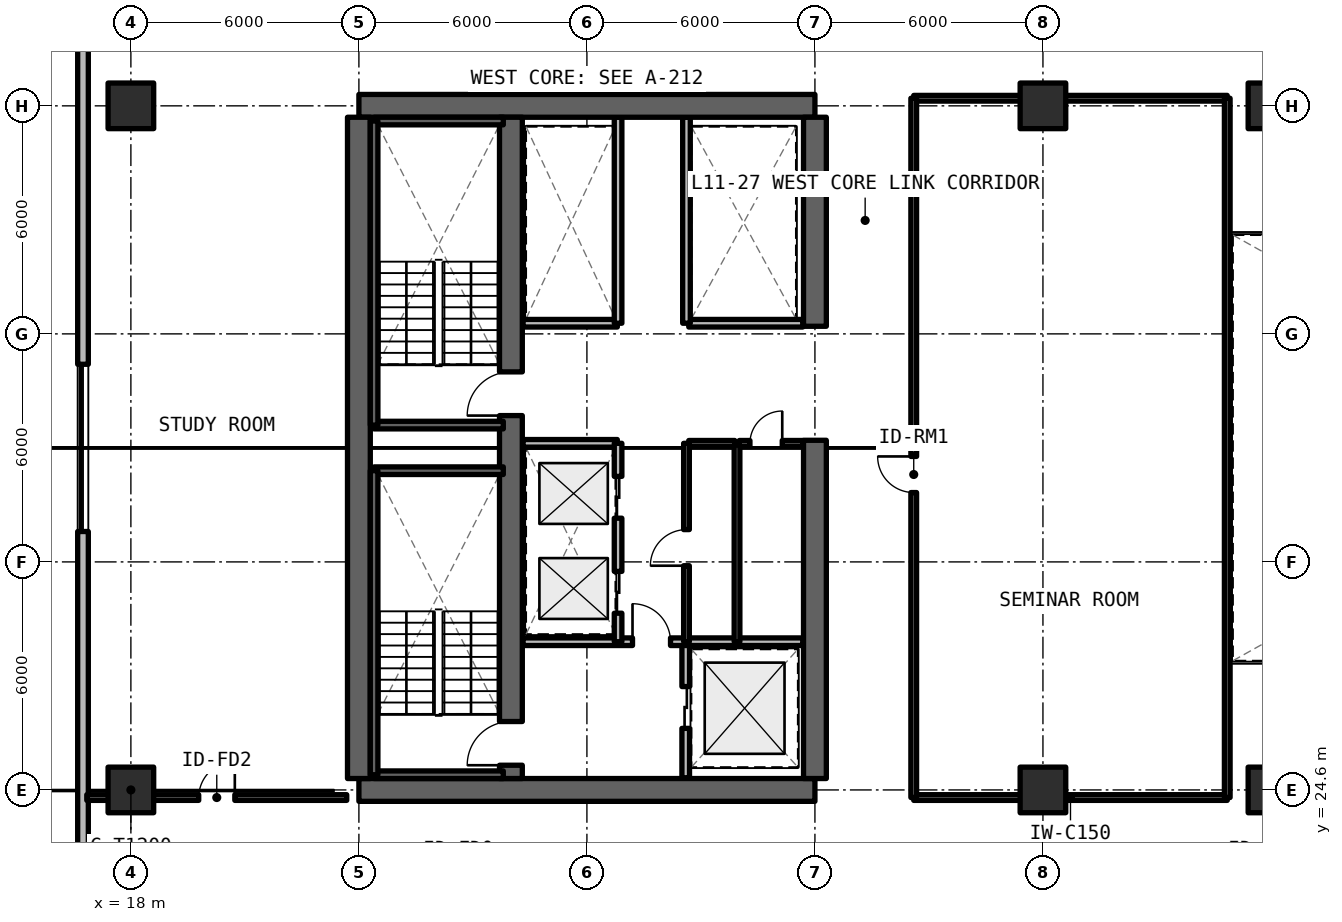
"""IFC4 building model, lengths in metres.
Left out: names, types, materials, properties, quantities, classifications, styles, units other than length and angle.
Written with IfcOpenShell. Run it as: python <this file> out.ifc"""

import sys

from ifc_helpers import new_model, si_unit, direction, frame, frame_2d, origin, origin_2d, place, context, subcontext, project, spatial, rectangle, extrude, element, fill, save


model = new_model("IFC4")
c1 = context("Model", 3, precision=1e-05, world=origin(), true_north=direction((0.0, 1.0)))
c2 = subcontext(c1, "Body", "Model", "MODEL_VIEW")
j1 = project(units=[si_unit("LENGTHUNIT", "METRE"), si_unit("PLANEANGLEUNIT", "RADIAN")], contexts=[c1])
p1 = place(None, origin())
s1 = spatial("IfcSite", under=j1, at=p1, CompositionType="ELEMENT")
p2 = place(p1, origin())
s2 = spatial("IfcBuilding", under=s1, at=p2, CompositionType="ELEMENT")
p3 = place(p2, frame((0.0, 0.0, 42.24)))
s3 = spatial("IfcBuildingStorey", under=s2, at=p3, CompositionType="ELEMENT", Elevation=42.24)
for number, where, z_axis, x_axis in (
    (1, (24.0, 24.6, 0.0), (0.0, 0.0, 1.0), (1.0, 0.0, 0.0)),
    (2, (36.0, 42.6, 0.0), (0.0, 0.0, 1.0), (-1.0, 0.0, 0.0)),
):
    element("IfcWall", number, at=place(p3, frame(where, z_axis=z_axis, x_axis=x_axis)), inside=s3, PredefinedType="SHEAR", context=c2, shape_type="SweptSolid", body=[
        extrude(rectangle(XDim=12.0, YDim=0.6, at=frame_2d((6.0, 0.0))), origin(), (0.0, 0.0, 1.0), 3.3),
    ])
p4 = place(p3, frame((24.0, 24.9, 0.0), z_axis=(0.0, 0.0, 1.0), x_axis=(0.0, 1.0, 0.0)))
e3 = element("IfcWall", 3, at=p4, inside=s3, PredefinedType="SHEAR", context=c2, shape_type="SweptSolid", body=[
    extrude(rectangle(XDim=17.4, YDim=0.6, at=frame_2d((8.7, 0.0))), origin(), (0.0, 0.0, 1.0), 3.3),
])
p5 = place(p3, frame((36.0, 24.9, 0.0), z_axis=(0.0, 0.0, 1.0), x_axis=(0.0, 1.0, 0.0)))
e4 = element("IfcWall", 4, at=p5, inside=s3, PredefinedType="SHEAR", context=c2, shape_type="SweptSolid", body=[
    extrude(rectangle(XDim=8.9, YDim=0.6, at=frame_2d((4.45, 0.0))), origin(), (0.0, 0.0, 1.0), 3.3),
])
p6 = place(p3, frame((36.0, 36.8, 0.0), z_axis=(0.0, 0.0, 1.0), x_axis=(0.0, 1.0, 0.0)))
e5 = element("IfcWall", 5, at=p6, inside=s3, PredefinedType="SHEAR", context=c2, shape_type="SweptSolid", body=[
    extrude(rectangle(XDim=5.5, YDim=0.6, at=frame_2d((2.75, 0.0))), origin(), (0.0, 0.0, 1.0), 3.3),
])
p7 = place(p3, frame((28.0, 24.9, 0.0), z_axis=(0.0, 0.0, 1.0), x_axis=(0.0, 1.0, 0.0)))
e6 = element("IfcWall", 6, at=p7, inside=s3, PredefinedType="SHEAR", context=c2, shape_type="SweptSolid", body=[
    extrude(rectangle(XDim=17.4, YDim=0.6, at=frame_2d((8.7, 0.0))), origin(), (0.0, 0.0, 1.0), 3.3),
])
p8 = place(p7, frame((0.35, 0.0, 0.0)))
e7 = element("IfcOpeningElement", 7, at=p8, cuts=e6, PredefinedType="OPENING", context=c2, shape_type="SweptSolid", body=[
    extrude(rectangle(XDim=1.15, YDim=2.15, at=frame_2d((0.575, 1.075))), frame((0.0, 0.31, 0.0), z_axis=(0.0, -1.0, 0.0), x_axis=(1.0, 0.0, 0.0)), (0.0, 0.0, 1.0), 0.62),
])
p9 = place(p7, frame((9.55, 0.0, 0.0)))
e8 = element("IfcOpeningElement", 8, at=p9, cuts=e6, PredefinedType="OPENING", context=c2, shape_type="SweptSolid", body=[
    extrude(rectangle(XDim=1.15, YDim=2.15, at=frame_2d((0.575, 1.075))), frame((0.0, 0.31, 0.0), z_axis=(0.0, -1.0, 0.0), x_axis=(1.0, 0.0, 0.0)), (0.0, 0.0, 1.0), 0.62),
])
for number, where, z_axis, x_axis in (
    (9, (18.0, 24.6, 0.0), (0.0, 0.0, 1.0), (1.0, 0.0, 0.0)),
    (10, (18.0, 42.6, 0.0), (0.0, 0.0, 1.0), (1.0, 0.0, 0.0)),
    (11, (42.0, 24.6, 0.0), (0.0, 0.0, 1.0), (1.0, 0.0, 0.0)),
    (12, (42.0, 42.6, 0.0), (0.0, 0.0, 1.0), (1.0, 0.0, 0.0)),
    (13, (48.0, 24.6, 0.0), (0.0, 0.0, 1.0), (1.0, 0.0, 0.0)),
    (14, (48.0, 42.6, 0.0), (0.0, 0.0, 1.0), (1.0, 0.0, 0.0)),
):
    element("IfcColumn", number, at=place(p3, frame(where, z_axis=z_axis, x_axis=x_axis)), inside=s3, PredefinedType="COLUMN", context=c2, shape_type="SweptSolid", body=[
        extrude(rectangle(XDim=1.2, YDim=1.2, at=origin_2d()), origin(), (0.0, 0.0, 1.0), 3.3),
    ])
p10 = place(p3, frame((16.74, 55.342, 0.0), z_axis=(0.0, 0.0, 1.0), x_axis=(0.0, -1.0, 0.0)))
e15 = element("IfcWall", 15, at=p10, inside=s3, PredefinedType="SOLIDWALL", context=c2, shape_type="SweptSolid", body=[
    extrude(rectangle(XDim=43.484, YDim=0.28, at=frame_2d((21.742, 0.0))), origin(), (0.0, 0.0, 1.0), 3.08),
])
p11 = place(p10, frame((19.542, 0.0, 0.78)))
e16 = element("IfcOpeningElement", 16, at=p11, cuts=e15, PredefinedType="OPENING", context=c2, shape_type="SweptSolid", body=[
    extrude(rectangle(XDim=4.4, YDim=1.66, at=frame_2d((2.2, 0.83))), frame((0.0, 0.15, 0.0), z_axis=(0.0, -1.0, 0.0), x_axis=(1.0, 0.0, 0.0)), (0.0, 0.0, 1.0), 0.3),
])
p12 = place(p10, frame((37.573, 0.0, 0.78)))
e17 = element("IfcOpeningElement", 17, at=p12, cuts=e15, PredefinedType="OPENING", context=c2, shape_type="SweptSolid", body=[
    extrude(rectangle(XDim=4.4, YDim=1.66, at=frame_2d((2.2, 0.83))), frame((0.0, 0.15, 0.0), z_axis=(0.0, -1.0, 0.0), x_axis=(1.0, 0.0, 0.0)), (0.0, 0.0, 1.0), 0.3),
])
p13 = place(p3, frame((32.6, 24.92, 0.0), z_axis=(0.0, 0.0, 1.0), x_axis=(0.0, 1.0, 0.0)))
e18 = element("IfcWall", 18, at=p13, inside=s3, PredefinedType="SOLIDWALL", context=c2, shape_type="SweptSolid", body=[
    extrude(rectangle(XDim=3.58, YDim=0.2, at=frame_2d((1.79, 0.0))), origin(), (0.0, 0.0, 1.0), 2.35),
])
p14 = place(p13, frame((1.3, 0.0, 0.0)))
e19 = element("IfcOpeningElement", 19, at=p14, cuts=e18, PredefinedType="OPENING", context=c2, shape_type="SweptSolid", body=[
    extrude(rectangle(XDim=1.1, YDim=2.2, at=frame_2d((0.55, 1.1))), frame((0.0, 0.11, 0.0), z_axis=(0.0, -1.0, 0.0), x_axis=(1.0, 0.0, 0.0)), (0.0, 0.0, 1.0), 0.22),
])
p15 = place(p3, frame((28.32, 28.5, 0.0), z_axis=(0.0, 0.0, 1.0), x_axis=(1.0, 0.0, 0.0)))
e20 = element("IfcWall", 20, at=p15, inside=s3, PredefinedType="SOLIDWALL", context=c2, shape_type="SweptSolid", body=[
    extrude(rectangle(XDim=7.36, YDim=0.2, at=frame_2d((3.68, 0.0))), origin(), (0.0, 0.0, 1.0), 2.35),
])
p16 = place(p15, frame((2.88, 0.0, 0.0)))
e21 = element("IfcOpeningElement", 21, at=p16, cuts=e20, PredefinedType="OPENING", context=c2, shape_type="SweptSolid", body=[
    extrude(rectangle(XDim=1.0, YDim=2.15, at=frame_2d((0.5, 1.075))), frame((0.0, 0.11, 0.0), z_axis=(0.0, -1.0, 0.0), x_axis=(1.0, 0.0, 0.0)), (0.0, 0.0, 1.0), 0.22),
])
p17 = place(p3, frame((28.32, 33.72, 0.0), z_axis=(0.0, 0.0, 1.0), x_axis=(1.0, 0.0, 0.0)))
e22 = element("IfcWall", 22, at=p17, inside=s3, PredefinedType="SOLIDWALL", context=c2, shape_type="SweptSolid", body=[
    extrude(rectangle(XDim=2.48, YDim=0.2, at=frame_2d((1.24, 0.0))), origin(), (0.0, 0.0, 1.0), 2.35),
])
p18 = place(p3, frame((30.82, 28.5, 0.0), z_axis=(0.0, 0.0, 1.0), x_axis=(0.0, 1.0, 0.0)))
e23 = element("IfcWall", 23, at=p18, inside=s3, PredefinedType="SOLIDWALL", context=c2, shape_type="SweptSolid", body=[
    extrude(rectangle(XDim=5.22, YDim=0.2, at=frame_2d((2.61, 0.0))), origin(), (0.0, 0.0, 1.0), 2.35),
])
p19 = place(p18, frame((0.75, 0.0, 0.0)))
e24 = element("IfcOpeningElement", 24, at=p19, cuts=e23, PredefinedType="OPENING", context=c2, shape_type="SweptSolid", body=[
    extrude(rectangle(XDim=1.1, YDim=2.2, at=frame_2d((0.55, 1.1))), frame((0.0, 0.11, 0.0), z_axis=(0.0, -1.0, 0.0), x_axis=(1.0, 0.0, 0.0)), (0.0, 0.0, 1.0), 0.22),
])
p20 = place(p18, frame((3.25, 0.0, 0.0)))
e25 = element("IfcOpeningElement", 25, at=p20, cuts=e23, PredefinedType="OPENING", context=c2, shape_type="SweptSolid", body=[
    extrude(rectangle(XDim=1.1, YDim=2.2, at=frame_2d((0.55, 1.1))), frame((0.0, 0.11, 0.0), z_axis=(0.0, -1.0, 0.0), x_axis=(1.0, 0.0, 0.0)), (0.0, 0.0, 1.0), 0.22),
])
p21 = place(p3, frame((33.95, 28.5, 0.0), z_axis=(0.0, 0.0, 1.0), x_axis=(0.0, 1.0, 0.0)))
e26 = element("IfcWall", 26, at=p21, inside=s3, PredefinedType="SOLIDWALL", context=c2, shape_type="SweptSolid", body=[
    extrude(rectangle(XDim=5.22, YDim=0.15, at=frame_2d((2.61, 0.0))), origin(), (0.0, 0.0, 1.0), 2.35),
])
p22 = place(p3, frame((32.68, 33.72, 0.0), z_axis=(0.0, 0.0, 1.0), x_axis=(1.0, 0.0, 0.0)))
e27 = element("IfcWall", 27, at=p22, inside=s3, PredefinedType="SOLIDWALL", context=c2, shape_type="SweptSolid", body=[
    extrude(rectangle(XDim=1.21, YDim=0.15, at=frame_2d((0.605, 0.0))), origin(), (0.0, 0.0, 1.0), 2.35),
])
p23 = place(p3, frame((34.01, 33.72, 0.0), z_axis=(0.0, 0.0, 1.0), x_axis=(1.0, 0.0, 0.0)))
e28 = element("IfcWall", 28, at=p23, inside=s3, PredefinedType="SOLIDWALL", context=c2, shape_type="SweptSolid", body=[
    extrude(rectangle(XDim=1.67, YDim=0.15, at=frame_2d((0.835, 0.0))), origin(), (0.0, 0.0, 1.0), 2.35),
])
p24 = place(p23, frame((0.28, 0.0, 0.0)))
e29 = element("IfcOpeningElement", 29, at=p24, cuts=e28, PredefinedType="OPENING", context=c2, shape_type="SweptSolid", body=[
    extrude(rectangle(XDim=0.85, YDim=2.1, at=frame_2d((0.425, 1.05))), frame((0.0, 0.085, 0.0), z_axis=(0.0, -1.0, 0.0), x_axis=(1.0, 0.0, 0.0)), (0.0, 0.0, 1.0), 0.17),
])
p25 = place(p3, frame((32.62, 28.5, 0.0), z_axis=(0.0, 0.0, 1.0), x_axis=(0.0, 1.0, 0.0)))
e30 = element("IfcWall", 30, at=p25, inside=s3, PredefinedType="SOLIDWALL", context=c2, shape_type="SweptSolid", body=[
    extrude(rectangle(XDim=5.22, YDim=0.15, at=frame_2d((2.61, 0.0))), origin(), (0.0, 0.0, 1.0), 2.35),
])
p26 = place(p25, frame((2.0, 0.0, 0.0)))
e31 = element("IfcOpeningElement", 31, at=p26, cuts=e30, PredefinedType="OPENING", context=c2, shape_type="SweptSolid", body=[
    extrude(rectangle(XDim=0.95, YDim=2.15, at=frame_2d((0.475, 1.075))), frame((0.0, 0.085, 0.0), z_axis=(0.0, -1.0, 0.0), x_axis=(1.0, 0.0, 0.0)), (0.0, 0.0, 1.0), 0.17),
])
p27 = place(p3, frame((28.32, 36.88, 0.0), z_axis=(0.0, 0.0, 1.0), x_axis=(1.0, 0.0, 0.0)))
e32 = element("IfcWall", 32, at=p27, inside=s3, PredefinedType="SOLIDWALL", context=c2, shape_type="SweptSolid", body=[
    extrude(rectangle(XDim=2.48, YDim=0.2, at=frame_2d((1.24, 0.0))), origin(), (0.0, 0.0, 1.0), 2.35),
])
p28 = place(p3, frame((30.82, 36.88, 0.0), z_axis=(0.0, 0.0, 1.0), x_axis=(0.0, 1.0, 0.0)))
e33 = element("IfcWall", 33, at=p28, inside=s3, PredefinedType="SOLIDWALL", context=c2, shape_type="SweptSolid", body=[
    extrude(rectangle(XDim=5.42, YDim=0.2, at=frame_2d((2.71, 0.0))), origin(), (0.0, 0.0, 1.0), 2.35),
])
p29 = place(p3, frame((32.68, 36.88, 0.0), z_axis=(0.0, 0.0, 1.0), x_axis=(1.0, 0.0, 0.0)))
e34 = element("IfcWall", 34, at=p29, inside=s3, PredefinedType="SOLIDWALL", context=c2, shape_type="SweptSolid", body=[
    extrude(rectangle(XDim=3.0, YDim=0.2, at=frame_2d((1.5, 0.0))), origin(), (0.0, 0.0, 1.0), 2.35),
])
p30 = place(p3, frame((32.62, 36.88, 0.0), z_axis=(0.0, 0.0, 1.0), x_axis=(0.0, 1.0, 0.0)))
e35 = element("IfcWall", 35, at=p30, inside=s3, PredefinedType="SOLIDWALL", context=c2, shape_type="SweptSolid", body=[
    extrude(rectangle(XDim=5.42, YDim=0.2, at=frame_2d((2.71, 0.0))), origin(), (0.0, 0.0, 1.0), 2.35),
])
for number, where, z_axis, x_axis in (
    (36, (38.6, 24.4, 0.0), (0.0, 0.0, 1.0), (1.0, 0.0, 0.0)),
    (37, (38.6, 42.8, 0.0), (0.0, 0.0, 1.0), (1.0, 0.0, 0.0)),
):
    element("IfcWall", number, at=place(p3, frame(where, z_axis=z_axis, x_axis=x_axis)), inside=s3, PredefinedType="SOLIDWALL", context=c2, shape_type="SweptSolid", body=[
        extrude(rectangle(XDim=8.25, YDim=0.15, at=frame_2d((4.125, 0.0))), origin(), (0.0, 0.0, 1.0), 2.295),
    ])
p31 = place(p3, frame((38.6, 24.4, 0.0), z_axis=(0.0, 0.0, 1.0), x_axis=(0.0, 1.0, 0.0)))
e38 = element("IfcWall", 38, at=p31, inside=s3, PredefinedType="SOLIDWALL", context=c2, shape_type="SweptSolid", body=[
    extrude(rectangle(XDim=18.4, YDim=0.15, at=frame_2d((9.2, 0.0))), origin(), (0.0, 0.0, 1.0), 2.35),
])
p32 = place(p31, frame((8.025, 0.0, 0.0)))
e39 = element("IfcOpeningElement", 39, at=p32, cuts=e38, PredefinedType="OPENING", context=c2, shape_type="SweptSolid", body=[
    extrude(rectangle(XDim=0.95, YDim=2.15, at=frame_2d((0.475, 1.075))), frame((0.0, 0.085, 0.0), z_axis=(0.0, -1.0, 0.0), x_axis=(1.0, 0.0, 0.0)), (0.0, 0.0, 1.0), 0.17),
])
p33 = place(p3, frame((46.85, 24.4, 0.0), z_axis=(0.0, 0.0, 1.0), x_axis=(0.0, 1.0, 0.0)))
e40 = element("IfcWall", 40, at=p33, inside=s3, PredefinedType="SOLIDWALL", context=c2, shape_type="SweptSolid", body=[
    extrude(rectangle(XDim=18.4, YDim=0.15, at=frame_2d((9.2, 0.0))), origin(), (0.0, 0.0, 1.0), 2.35),
])
p34 = place(p3, frame((16.84, 24.4, 0.0), z_axis=(0.0, 0.0, 1.0), x_axis=(1.0, 0.0, 0.0)))
e41 = element("IfcWall", 41, at=p34, inside=s3, PredefinedType="SOLIDWALL", context=c2, shape_type="SweptSolid", body=[
    extrude(rectangle(XDim=6.84, YDim=0.15, at=frame_2d((3.42, 0.0))), origin(), (0.0, 0.0, 1.0), 2.295),
])
p35 = place(p34, frame((2.945, 0.0, 0.0)))
e42 = element("IfcOpeningElement", 42, at=p35, cuts=e41, PredefinedType="OPENING", context=c2, shape_type="SweptSolid", body=[
    extrude(rectangle(XDim=0.95, YDim=2.15, at=frame_2d((0.475, 1.075))), frame((0.0, 0.085, 0.0), z_axis=(0.0, -1.0, 0.0), x_axis=(1.0, 0.0, 0.0)), (0.0, 0.0, 1.0), 0.17),
])
for number, where, z_axis, x_axis in (
    (43, (24.4, 25.0, 0.0), (0.0, 0.0, 1.0), (1.0, 0.0, 0.0)),
    (44, (27.8, 33.0, 0.0), (0.0, 0.0, 1.0), (-1.0, 0.0, 0.0)),
):
    element("IfcWall", number, at=place(p3, frame(where, z_axis=z_axis, x_axis=x_axis)), inside=s3, PredefinedType="SOLIDWALL", context=c2, shape_type="SweptSolid", body=[
        extrude(rectangle(XDim=3.4, YDim=0.2, at=frame_2d((1.7, 0.0))), origin(), (0.0, 0.0, 1.0), 3.3),
    ])
p36 = place(p3, frame((24.4, 33.0, 0.0), z_axis=(0.0, 0.0, 1.0), x_axis=(0.0, -1.0, 0.0)))
e45 = element("IfcWall", 45, at=p36, inside=s3, PredefinedType="SOLIDWALL", context=c2, shape_type="SweptSolid", body=[
    extrude(rectangle(XDim=8.0, YDim=0.2, at=frame_2d((4.0, 0.0))), origin(), (0.0, 0.0, 1.0), 3.3),
])
for number, where, z_axis, x_axis in (
    (46, (24.4, 34.2, 0.0), (0.0, 0.0, 1.0), (1.0, 0.0, 0.0)),
    (47, (27.8, 42.2, 0.0), (0.0, 0.0, 1.0), (-1.0, 0.0, 0.0)),
):
    element("IfcWall", number, at=place(p3, frame(where, z_axis=z_axis, x_axis=x_axis)), inside=s3, PredefinedType="SOLIDWALL", context=c2, shape_type="SweptSolid", body=[
        extrude(rectangle(XDim=3.4, YDim=0.2, at=frame_2d((1.7, 0.0))), origin(), (0.0, 0.0, 1.0), 3.3),
    ])
p37 = place(p3, frame((24.4, 42.2, 0.0), z_axis=(0.0, 0.0, 1.0), x_axis=(0.0, -1.0, 0.0)))
e48 = element("IfcWall", 48, at=p37, inside=s3, PredefinedType="SOLIDWALL", context=c2, shape_type="SweptSolid", body=[
    extrude(rectangle(XDim=8.0, YDim=0.2, at=frame_2d((4.0, 0.0))), origin(), (0.0, 0.0, 1.0), 3.3),
])
p38 = place(p11, origin())
e49 = element("IfcWindow", 49, at=p38, inside=s3, PartitioningType="SINGLE_PANEL", PredefinedType="WINDOW", context=c2, shape_type="SweptSolid", body=[
    extrude(rectangle(XDim=4.4, YDim=1.66, at=frame_2d((2.2, 0.83))), frame((0.0, 0.03, 0.0), z_axis=(0.0, -1.0, 0.0), x_axis=(1.0, 0.0, 0.0)), (0.0, 0.0, 1.0), 0.06),
])
fill(e16, e49)
p39 = place(p14, origin())
e50 = element("IfcDoor", 50, at=p39, inside=s3, OperationType="SLIDING_TO_LEFT", PredefinedType="DOOR", context=c2, shape_type="SweptSolid", body=[
    extrude(rectangle(XDim=1.1, YDim=2.2, at=frame_2d((0.55, 1.1))), frame((0.0, 0.025, 0.0), z_axis=(0.0, -1.0, 0.0), x_axis=(1.0, 0.0, 0.0)), (0.0, 0.0, 1.0), 0.05),
])
fill(e19, e50)
p40 = place(p16, origin())
e51 = element("IfcDoor", 51, at=p40, inside=s3, OperationType="SINGLE_SWING_LEFT", PredefinedType="DOOR", context=c2, shape_type="SweptSolid", body=[
    extrude(rectangle(XDim=1.0, YDim=2.15, at=frame_2d((0.5, 1.075))), frame((0.0, 0.025, 0.0), z_axis=(0.0, -1.0, 0.0), x_axis=(1.0, 0.0, 0.0)), (0.0, 0.0, 1.0), 0.05),
])
fill(e21, e51)
p41 = place(p19, origin())
e52 = element("IfcDoor", 52, at=p41, inside=s3, OperationType="SLIDING_TO_LEFT", PredefinedType="DOOR", context=c2, shape_type="SweptSolid", body=[
    extrude(rectangle(XDim=1.1, YDim=2.2, at=frame_2d((0.55, 1.1))), frame((0.0, 0.025, 0.0), z_axis=(0.0, -1.0, 0.0), x_axis=(1.0, 0.0, 0.0)), (0.0, 0.0, 1.0), 0.05),
])
fill(e24, e52)
p42 = place(p20, origin())
e53 = element("IfcDoor", 53, at=p42, inside=s3, OperationType="SLIDING_TO_RIGHT", PredefinedType="DOOR", context=c2, shape_type="SweptSolid", body=[
    extrude(rectangle(XDim=1.1, YDim=2.2, at=frame_2d((0.55, 1.1))), frame((0.0, 0.025, 0.0), z_axis=(0.0, -1.0, 0.0), x_axis=(1.0, 0.0, 0.0)), (0.0, 0.0, 1.0), 0.05),
])
fill(e25, e53)
p43 = place(p24, origin())
e54 = element("IfcDoor", 54, at=p43, inside=s3, OperationType="SINGLE_SWING_RIGHT", PredefinedType="DOOR", context=c2, shape_type="SweptSolid", body=[
    extrude(rectangle(XDim=0.85, YDim=2.1, at=frame_2d((0.425, 1.05))), frame((0.0, 0.025, 0.0), z_axis=(0.0, -1.0, 0.0), x_axis=(1.0, 0.0, 0.0)), (0.0, 0.0, 1.0), 0.05),
])
fill(e29, e54)
p44 = place(p26, origin())
e55 = element("IfcDoor", 55, at=p44, inside=s3, OperationType="SINGLE_SWING_LEFT", PredefinedType="DOOR", context=c2, shape_type="SweptSolid", body=[
    extrude(rectangle(XDim=0.95, YDim=2.15, at=frame_2d((0.475, 1.075))), frame((0.0, 0.025, 0.0), z_axis=(0.0, -1.0, 0.0), x_axis=(1.0, 0.0, 0.0)), (0.0, 0.0, 1.0), 0.05),
])
fill(e31, e55)
p45 = place(p32, origin())
e56 = element("IfcDoor", 56, at=p45, inside=s3, OperationType="SINGLE_SWING_RIGHT", PredefinedType="DOOR", context=c2, shape_type="SweptSolid", body=[
    extrude(rectangle(XDim=0.95, YDim=2.15, at=frame_2d((0.475, 1.075))), frame((0.0, 0.025, 0.0), z_axis=(0.0, -1.0, 0.0), x_axis=(1.0, 0.0, 0.0)), (0.0, 0.0, 1.0), 0.05),
])
fill(e39, e56)
p46 = place(p35, origin())
e57 = element("IfcDoor", 57, at=p46, inside=s3, OperationType="SINGLE_SWING_RIGHT", PredefinedType="DOOR", context=c2, shape_type="SweptSolid", body=[
    extrude(rectangle(XDim=0.95, YDim=2.15, at=frame_2d((0.475, 1.075))), frame((0.0, 0.025, 0.0), z_axis=(0.0, -1.0, 0.0), x_axis=(1.0, 0.0, 0.0)), (0.0, 0.0, 1.0), 0.05),
])
fill(e42, e57)
p47 = place(p8, origin())
e58 = element("IfcDoor", 58, at=p47, inside=s3, OperationType="SINGLE_SWING_RIGHT", PredefinedType="DOOR", context=c2, shape_type="SweptSolid", body=[
    extrude(rectangle(XDim=1.15, YDim=2.15, at=frame_2d((0.575, 1.075))), frame((0.0, 0.025, 0.0), z_axis=(0.0, -1.0, 0.0), x_axis=(1.0, 0.0, 0.0)), (0.0, 0.0, 1.0), 0.05),
])
fill(e7, e58)
p48 = place(p9, origin())
e59 = element("IfcDoor", 59, at=p48, inside=s3, OperationType="SINGLE_SWING_LEFT", PredefinedType="DOOR", context=c2, shape_type="SweptSolid", body=[
    extrude(rectangle(XDim=1.15, YDim=2.15, at=frame_2d((0.575, 1.075))), frame((0.0, 0.025, 0.0), z_axis=(0.0, -1.0, 0.0), x_axis=(1.0, 0.0, 0.0)), (0.0, 0.0, 1.0), 0.05),
])
fill(e8, e59)
save(model, sys.argv[1])
